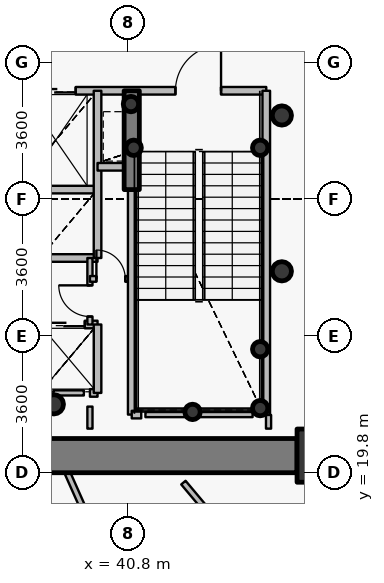
"""IFC4 building model, lengths in metres.
Left out: names, types, materials, properties, quantities, classifications, styles, units other than length and angle.
Written with IfcOpenShell. Run it as: python <this file> out.ifc"""

import sys

from ifc_helpers import new_model, si_unit, direction, frame, frame_2d, origin, origin_2d, place, context, subcontext, project, spatial, rectangle, hollow_circle, extrude, source, transform, mapped, element, fill, save


model = new_model("IFC4")
c1 = context("Model", 3, precision=1e-05, world=origin(), true_north=direction((0.0, 1.0)))
c2 = subcontext(c1, "Body", "Model", "MODEL_VIEW")
j1 = project(units=[si_unit("LENGTHUNIT", "METRE"), si_unit("PLANEANGLEUNIT", "RADIAN")], contexts=[c1])
p1 = place(None, origin())
s1 = spatial("IfcSite", under=j1, at=p1, CompositionType="ELEMENT")
p2 = place(p1, origin())
s2 = spatial("IfcBuilding", under=s1, at=p2, CompositionType="ELEMENT")
p3 = place(p2, frame((0.0, 0.0, 32.4)))
s3 = spatial("IfcBuildingStorey", under=s2, at=p3, CompositionType="ELEMENT", Elevation=32.4)
p4 = place(p3, frame((45.95, 20.25, 0.0), z_axis=(0.0, 0.0, 1.0), x_axis=(1.0, 0.0, 0.0)))
e1 = element("IfcColumn", 1, at=p4, inside=s3, PredefinedType="COLUMN", context=c2, shape_type="SweptSolid", body=[
    extrude(rectangle(XDim=1.4, YDim=1.4, at=origin_2d()), origin(), (0.0, 0.0, 1.0), 4.2),
])
p5 = place(p3, frame((38.85, 21.6, 0.0), z_axis=(0.0, 0.0, 1.0), x_axis=(1.0, 0.0, 0.0)))
e2 = element("IfcColumn", 2, at=p5, inside=s3, PredefinedType="COLUMN", context=c2, shape_type="SweptSolid", body=[
    extrude(hollow_circle(Radius=0.254, WallThickness=0.02, at=origin_2d()), origin(), (0.0, 0.0, 1.0), 4.2),
])
for number, where, z_axis, x_axis in (
    (3, (44.28, 21.5, 0.0), (0.0, 0.0, 1.0), (1.0, 0.0, 0.0)),
    (4, (44.28, 23.05, 0.0), (0.0, 0.0, 1.0), (1.0, 0.0, 0.0)),
    (5, (42.5, 21.4, 0.0), (0.0, 0.0, 1.0), (1.0, 0.0, 0.0)),
    (6, (40.95, 28.35, 0.0), (0.0, 0.0, 1.0), (1.0, 0.0, 0.0)),
    (7, (44.28, 28.35, 0.0), (0.0, 0.0, 1.0), (1.0, 0.0, 0.0)),
    (8, (40.88, 29.5, 0.0), (0.0, 0.0, 1.0), (1.0, 0.0, 0.0)),
):
    element("IfcColumn", number, at=place(p3, frame(where, z_axis=z_axis, x_axis=x_axis)), inside=s3, PredefinedType="COLUMN", context=c2, shape_type="SweptSolid", body=[
        extrude(hollow_circle(Radius=0.203, WallThickness=0.016, at=origin_2d()), origin(), (0.0, 0.0, 1.0), 4.2),
    ])
p6 = place(p3, frame((45.25, 20.25, 0.0), z_axis=(0.0, 0.0, 1.0), x_axis=(-1.0, 0.0, 0.0)))
e9 = element("IfcWall", 9, at=p6, inside=s3, PredefinedType="SHEAR", context=c2, shape_type="SweptSolid", body=[
    extrude(rectangle(XDim=18.5, YDim=0.9, at=frame_2d((9.25, 0.0))), origin(), (0.0, 0.0, 1.0), 3.4),
])
p7 = place(p6, frame((10.0, 0.0, 0.0)))
e10 = element("IfcOpeningElement", 10, at=p7, cuts=e9, PredefinedType="OPENING", context=c2, shape_type="SweptSolid", body=[
    extrude(rectangle(XDim=1.15, YDim=2.15, at=origin_2d()), frame((0.575, 0.46, 1.075), z_axis=(0.0, -1.0, 0.0), x_axis=(1.0, 0.0, 0.0)), (0.0, 0.0, 1.0), 0.92),
])
p8 = place(p3, frame((40.9, 27.25, 0.0), z_axis=(0.0, 0.0, 1.0), x_axis=(0.0, 1.0, 0.0)))
e11 = element("IfcWall", 11, at=p8, inside=s3, PredefinedType="SHEAR", context=c2, shape_type="SweptSolid", body=[
    extrude(rectangle(XDim=2.6, YDim=0.4, at=frame_2d((1.3, 0.0))), origin(), (0.0, 0.0, 1.0), 3.55),
])
for number, where, z_axis, x_axis in (
    (12, (44.85, 25.1, 0.0), (0.0, 0.0, 1.0), (1.0, 0.0, 0.0)),
    (13, (44.85, 29.2, 0.0), (0.0, 0.0, 1.0), (1.0, 0.0, 0.0)),
):
    element("IfcColumn", number, at=place(p3, frame(where, z_axis=z_axis, x_axis=x_axis)), inside=s3, PredefinedType="COLUMN", context=c2, shape_type="SweptSolid", body=[
        extrude(hollow_circle(Radius=0.254, WallThickness=0.02, at=origin_2d()), origin(), (0.0, 0.0, 1.0), 4.2),
    ])
p9 = place(p3, frame((35.05, 27.25, 0.0), z_axis=(0.0, 0.0, 1.0), x_axis=(1.0, 0.0, 0.0)))
e14 = element("IfcWall", 14, at=p9, inside=s3, PredefinedType="PARTITIONING", context=c2, shape_type="SweptSolid", body=[
    extrude(rectangle(XDim=4.95, YDim=0.2, at=frame_2d((2.475, 0.0))), origin(), (0.0, 0.0, 1.0), 3.535),
])
p10 = place(p3, frame((35.45, 23.7, 0.0), z_axis=(0.0, 0.0, 1.0), x_axis=(1.0, 0.0, 0.0)))
e15 = element("IfcWall", 15, at=p10, inside=s3, PredefinedType="PARTITIONING", context=c2, shape_type="SweptSolid", body=[
    extrude(rectangle(XDim=4.55, YDim=0.2, at=frame_2d((2.275, 0.0))), origin(), (0.0, 0.0, 1.0), 3.535),
])
p11 = place(p10, frame((0.25, 0.0, 0.0)))
e16 = element("IfcOpeningElement", 16, at=p11, cuts=e15, PredefinedType="OPENING", context=c2, shape_type="SweptSolid", body=[
    extrude(rectangle(XDim=1.05, YDim=2.15, at=origin_2d()), frame((0.525, 0.11, 1.075), z_axis=(0.0, -1.0, 0.0), x_axis=(1.0, 0.0, 0.0)), (0.0, 0.0, 1.0), 0.22),
])
p12 = place(p10, frame((1.745, 0.0, 0.0)))
e17 = element("IfcOpeningElement", 17, at=p12, cuts=e15, PredefinedType="OPENING", context=c2, shape_type="SweptSolid", body=[
    extrude(rectangle(XDim=1.05, YDim=2.15, at=origin_2d()), frame((0.525, 0.11, 1.075), z_axis=(0.0, -1.0, 0.0), x_axis=(1.0, 0.0, 0.0)), (0.0, 0.0, 1.0), 0.22),
])
p13 = place(p10, frame((3.165, 0.0, 0.0)))
e18 = element("IfcOpeningElement", 18, at=p13, cuts=e15, PredefinedType="OPENING", context=c2, shape_type="SweptSolid", body=[
    extrude(rectangle(XDim=1.05, YDim=2.15, at=origin_2d()), frame((0.525, 0.11, 1.075), z_axis=(0.0, -1.0, 0.0), x_axis=(1.0, 0.0, 0.0)), (0.0, 0.0, 1.0), 0.22),
])
p14 = place(p3, frame((35.45, 25.45, 0.0), z_axis=(0.0, 0.0, 1.0), x_axis=(1.0, 0.0, 0.0)))
e19 = element("IfcWall", 19, at=p14, inside=s3, PredefinedType="PARTITIONING", context=c2, shape_type="SweptSolid", body=[
    extrude(rectangle(XDim=4.55, YDim=0.2, at=frame_2d((2.275, 0.0))), origin(), (0.0, 0.0, 1.0), 3.535),
])
p15 = place(p3, frame((35.95, 29.85, 0.0), z_axis=(0.0, 0.0, 1.0), x_axis=(1.0, 0.0, 0.0)))
e20 = element("IfcWall", 20, at=p15, inside=s3, PredefinedType="PARTITIONING", context=c2, shape_type="SweptSolid", body=[
    extrude(rectangle(XDim=8.49, YDim=0.2, at=frame_2d((4.245, 0.0))), origin(), (0.0, 0.0, 1.0), 3.535),
])
p16 = place(p15, frame((6.1, 0.0, 0.0)))
e21 = element("IfcOpeningElement", 21, at=p16, cuts=e20, PredefinedType="OPENING", context=c2, shape_type="SweptSolid", body=[
    extrude(rectangle(XDim=1.2, YDim=2.15, at=origin_2d()), frame((0.6, 0.11, 1.075), z_axis=(0.0, -1.0, 0.0), x_axis=(1.0, 0.0, 0.0)), (0.0, 0.0, 1.0), 0.22),
])
p17 = place(p15, frame((0.37, 0.0, 0.0)))
e22 = element("IfcOpeningElement", 22, at=p17, cuts=e20, PredefinedType="OPENING", context=c2, shape_type="SweptSolid", body=[
    extrude(rectangle(XDim=1.15, YDim=2.15, at=origin_2d()), frame((0.575, 0.11, 1.075), z_axis=(0.0, -1.0, 0.0), x_axis=(1.0, 0.0, 0.0)), (0.0, 0.0, 1.0), 0.22),
])
p18 = place(p15, frame((2.425, 0.0, 0.0)))
e23 = element("IfcOpeningElement", 23, at=p18, cuts=e20, PredefinedType="OPENING", context=c2, shape_type="SweptSolid", body=[
    extrude(rectangle(XDim=1.05, YDim=2.15, at=origin_2d()), frame((0.525, 0.11, 1.075), z_axis=(0.0, -1.0, 0.0), x_axis=(1.0, 0.0, 0.0)), (0.0, 0.0, 1.0), 0.22),
])
p19 = place(p3, frame((39.206, 19.8, 0.0), z_axis=(0.0, 0.0, 1.0), x_axis=(0.406734516924, -0.913546404263, 0.0)))
e24 = element("IfcWall", 24, at=p19, inside=s3, PredefinedType="PARTITIONING", context=c2, shape_type="SweptSolid", body=[
    extrude(rectangle(XDim=17.213, YDim=0.15, at=frame_2d((8.606, 0.0))), origin(), (0.0, 0.0, 1.0), 3.285),
])
p20 = place(p19, frame((4.228, 0.0, 0.0)))
e25 = element("IfcOpeningElement", 25, at=p20, cuts=e24, PredefinedType="OPENING", context=c2, shape_type="SweptSolid", body=[
    extrude(rectangle(XDim=0.82, YDim=2.1, at=origin_2d()), frame((0.41, 0.085, 1.05), z_axis=(0.0, -1.0, 0.0), x_axis=(1.0, 0.0, 0.0)), (0.0, 0.0, 1.0), 0.17),
])
p21 = place(p19, frame((12.679, 0.0, 0.0)))
e26 = element("IfcOpeningElement", 26, at=p21, cuts=e24, PredefinedType="OPENING", context=c2, shape_type="SweptSolid", body=[
    extrude(rectangle(XDim=1.05, YDim=2.15, at=origin_2d()), frame((0.525, 0.085, 1.075), z_axis=(0.0, -1.0, 0.0), x_axis=(1.0, 0.0, 0.0)), (0.0, 0.0, 1.0), 0.17),
])
p22 = place(p3, frame((39.8, 21.9, 0.0), z_axis=(0.0, 0.0, 1.0), x_axis=(1.0, 0.0, 0.0)))
e27 = element("IfcWall", 27, at=p22, inside=s3, PredefinedType="PARTITIONING", context=c2, shape_type="SweptSolid", body=[
    extrude(rectangle(XDim=0.2, YDim=0.2, at=frame_2d((0.1, 0.0))), origin(), (0.0, 0.0, 1.0), 3.95),
])
p23 = place(p3, frame((39.8, 23.7, 0.0), z_axis=(0.0, 0.0, 1.0), x_axis=(0.0, 1.0, 0.0)))
e28 = element("IfcWall", 28, at=p23, inside=s3, PredefinedType="PARTITIONING", context=c2, shape_type="SweptSolid", body=[
    extrude(rectangle(XDim=1.75, YDim=0.135, at=frame_2d((0.875, 0.0))), origin(), (0.0, 0.0, 1.0), 3.95),
])
p24 = place(p23, frame((0.21, 0.0, 0.0)))
e29 = element("IfcOpeningElement", 29, at=p24, cuts=e28, PredefinedType="OPENING", context=c2, shape_type="SweptSolid", body=[
    extrude(rectangle(XDim=0.82, YDim=2.1, at=origin_2d()), frame((0.41, 0.078, 1.05), z_axis=(0.0, -1.0, 0.0), x_axis=(1.0, 0.0, 0.0)), (0.0, 0.0, 1.0), 0.155),
])
p25 = place(p3, frame((39.8, 24.9, 0.0), z_axis=(0.0, 0.0, 1.0), x_axis=(1.0, 0.0, 0.0)))
e30 = element("IfcWall", 30, at=p25, inside=s3, PredefinedType="PARTITIONING", context=c2, shape_type="SweptSolid", body=[
    extrude(rectangle(XDim=1.1, YDim=0.15, at=frame_2d((0.55, 0.0))), origin(), (0.0, 0.0, 1.0), 3.95),
])
p26 = place(p25, frame((0.17, 0.0, 0.0)))
e31 = element("IfcOpeningElement", 31, at=p26, cuts=e30, PredefinedType="OPENING", context=c2, shape_type="SweptSolid", body=[
    extrude(rectangle(XDim=0.76, YDim=2.1, at=origin_2d()), frame((0.38, 0.085, 1.05), z_axis=(0.0, -1.0, 0.0), x_axis=(1.0, 0.0, 0.0)), (0.0, 0.0, 1.0), 0.17),
])
p27 = place(p3, frame((40.0, 21.9, 0.0), z_axis=(0.0, 0.0, 1.0), x_axis=(0.0, 1.0, 0.0)))
e32 = element("IfcWall", 32, at=p27, inside=s3, PredefinedType="PARTITIONING", context=c2, shape_type="SweptSolid", body=[
    extrude(rectangle(XDim=1.8, YDim=0.2, at=frame_2d((0.9, 0.0))), origin(), (0.0, 0.0, 1.0), 3.95),
])
p28 = place(p3, frame((40.0, 25.45, 0.0), z_axis=(0.0, 0.0, 1.0), x_axis=(0.0, 1.0, 0.0)))
e33 = element("IfcWall", 33, at=p28, inside=s3, PredefinedType="PARTITIONING", context=c2, shape_type="SweptSolid", body=[
    extrude(rectangle(XDim=4.4, YDim=0.2, at=frame_2d((2.2, 0.0))), origin(), (0.0, 0.0, 1.0), 3.95),
])
p29 = place(p3, frame((40.0, 27.85, 0.0), z_axis=(0.0, 0.0, 1.0), x_axis=(1.0, 0.0, 0.0)))
e34 = element("IfcWall", 34, at=p29, inside=s3, PredefinedType="PARTITIONING", context=c2, shape_type="SweptSolid", body=[
    extrude(rectangle(XDim=0.9, YDim=0.2, at=frame_2d((0.45, 0.0))), origin(), (0.0, 0.0, 1.0), 3.95),
])
p30 = place(p3, frame((40.9, 21.33, 0.0), z_axis=(0.0, 0.0, 1.0), x_axis=(0.0, 1.0, 0.0)))
e35 = element("IfcWall", 35, at=p30, inside=s3, PredefinedType="PARTITIONING", context=c2, shape_type="SweptSolid", body=[
    extrude(rectangle(XDim=5.91, YDim=0.2, at=frame_2d((2.955, 0.0))), origin(), (0.0, 0.0, 1.0), 3.485),
])
p31 = place(p3, frame((40.9, 21.33, 0.0), z_axis=(0.0, 0.0, 1.0), x_axis=(1.0, 0.0, 0.0)))
e36 = element("IfcWall", 36, at=p31, inside=s3, PredefinedType="PARTITIONING", context=c2, shape_type="SweptSolid", body=[
    extrude(rectangle(XDim=0.25, YDim=0.2, at=frame_2d((0.125, 0.0))), origin(), (0.0, 0.0, 1.0), 3.485),
])
p32 = place(p3, frame((44.44, 21.33, 0.0), z_axis=(0.0, 0.0, 1.0), x_axis=(0.0, 1.0, 0.0)))
e37 = element("IfcWall", 37, at=p32, inside=s3, PredefinedType="PARTITIONING", context=c2, shape_type="SweptSolid", body=[
    extrude(rectangle(XDim=8.52, YDim=0.2, at=frame_2d((4.26, 0.0))), origin(), (0.0, 0.0, 1.0), 3.95),
])
p33 = place(p3, frame((44.08, 21.33, 0.0), z_axis=(0.0, 0.0, 1.0), x_axis=(-1.0, 0.0, 0.0)))
e38 = element("IfcWall", 38, at=p33, inside=s3, PredefinedType="PARTITIONING", context=c2, shape_type="SweptSolid", body=[
    extrude(rectangle(XDim=2.82, YDim=0.135, at=frame_2d((1.41, 0.0))), origin(), (0.0, 0.0, 1.0), 3.485),
])
p34 = place(p3, frame((39.64, 21.9, 0.0), z_axis=(0.0, 0.0, 1.0), x_axis=(-1.0, 0.0, 0.0)))
e39 = element("IfcWall", 39, at=p34, inside=s3, PredefinedType="PARTITIONING", context=c2, shape_type="SweptSolid", body=[
    extrude(rectangle(XDim=0.8, YDim=0.135, at=frame_2d((0.4, 0.0))), origin(), (0.0, 0.0, 1.0), 3.535),
])
p35 = place(p3, frame((39.8, 20.96, 0.0), z_axis=(0.0, 0.0, 1.0), x_axis=(0.0, 1.0, 0.0)))
e40 = element("IfcWall", 40, at=p35, inside=s3, PredefinedType="PARTITIONING", context=c2, shape_type="SweptSolid", body=[
    extrude(rectangle(XDim=0.58, YDim=0.135, at=frame_2d((0.29, 0.0))), origin(), (0.0, 0.0, 1.0), 3.485),
])
p36 = place(p3, frame((44.5, 20.96, 0.0), z_axis=(0.0, 0.0, 1.0), x_axis=(0.0, 1.0, 0.0)))
e41 = element("IfcWall", 41, at=p36, inside=s3, PredefinedType="PARTITIONING", context=c2, shape_type="SweptSolid", body=[
    extrude(rectangle(XDim=0.36, YDim=0.135, at=frame_2d((0.18, 0.0))), origin(), (0.0, 0.0, 1.0), 3.95),
])
p37 = place(p3, frame((42.26, 19.54, 0.0), z_axis=(0.0, 0.0, 1.0), x_axis=(0.642773520502, -0.766056265128, 0.0)))
e42 = element("IfcWall", 42, at=p37, inside=s3, PredefinedType="PARTITIONING", context=c2, shape_type="SweptSolid", body=[
    extrude(rectangle(XDim=5.418, YDim=0.15, at=frame_2d((2.709, 0.0))), origin(), (0.0, 0.0, 1.0), 3.95),
])
m1 = source(origin(), c2, "Body", "SweptSolid", [
    extrude(rectangle(XDim=1.2, YDim=2.15, at=origin_2d()), frame((0.6, 0.025, 1.075), z_axis=(0.0, -1.0, 0.0), x_axis=(1.0, 0.0, 0.0)), (0.0, 0.0, 1.0), 0.05),
])
p38 = place(p16, origin())
e43 = element("IfcDoor", 43, at=p38, inside=s3, OperationType="SINGLE_SWING_RIGHT", PredefinedType="DOOR", context=c2, shape_type="MappedRepresentation", body=[
    mapped(m1, transform((0.0, 0.0, 0.0), x_axis=(1.0, 0.0, 0.0), y_axis=(0.0, 1.0, 0.0), z_axis=(0.0, 0.0, 1.0), scale=1.0)),
])
fill(e21, e43)
m2 = source(origin(), c2, "Body", "SweptSolid", [
    extrude(rectangle(XDim=1.05, YDim=2.15, at=origin_2d()), frame((0.525, 0.025, 1.075), z_axis=(0.0, -1.0, 0.0), x_axis=(1.0, 0.0, 0.0)), (0.0, 0.0, 1.0), 0.05),
])
p39 = place(p18, origin())
e44 = element("IfcDoor", 44, at=p39, inside=s3, OperationType="DOUBLE_DOOR_SLIDING", PredefinedType="USERDEFINED", context=c2, shape_type="MappedRepresentation", body=[
    mapped(m2, transform((0.0, 0.0, 0.0), x_axis=(1.0, 0.0, 0.0), y_axis=(0.0, 1.0, 0.0), z_axis=(0.0, 0.0, 1.0), scale=1.0)),
])
fill(e23, e44)
p40 = place(p13, origin())
e45 = element("IfcDoor", 45, at=p40, inside=s3, OperationType="DOUBLE_DOOR_SLIDING", PredefinedType="USERDEFINED", context=c2, shape_type="MappedRepresentation", body=[
    mapped(m2, transform((0.0, 0.0, 0.0), x_axis=(1.0, 0.0, 0.0), y_axis=(0.0, 1.0, 0.0), z_axis=(0.0, 0.0, 1.0), scale=1.0)),
])
fill(e18, e45)
m3 = source(origin(), c2, "Body", "SweptSolid", [
    extrude(rectangle(XDim=0.82, YDim=2.1, at=origin_2d()), frame((0.41, 0.025, 1.05), z_axis=(0.0, -1.0, 0.0), x_axis=(1.0, 0.0, 0.0)), (0.0, 0.0, 1.0), 0.05),
])
p41 = place(p24, origin())
e46 = element("IfcDoor", 46, at=p41, inside=s3, OperationType="SINGLE_SWING_RIGHT", PredefinedType="DOOR", context=c2, shape_type="MappedRepresentation", body=[
    mapped(m3, transform((0.0, 0.0, 0.0), x_axis=(1.0, 0.0, 0.0), y_axis=(0.0, 1.0, 0.0), z_axis=(0.0, 0.0, 1.0), scale=1.0)),
])
fill(e29, e46)
m4 = source(origin(), c2, "Body", "SweptSolid", [
    extrude(rectangle(XDim=0.76, YDim=2.1, at=origin_2d()), frame((0.38, 0.025, 1.05), z_axis=(0.0, -1.0, 0.0), x_axis=(1.0, 0.0, 0.0)), (0.0, 0.0, 1.0), 0.05),
])
p42 = place(p26, origin())
e47 = element("IfcDoor", 47, at=p42, inside=s3, OperationType="SINGLE_SWING_LEFT", PredefinedType="DOOR", context=c2, shape_type="MappedRepresentation", body=[
    mapped(m4, transform((0.0, 0.0, 0.0), x_axis=(1.0, 0.0, 0.0), y_axis=(0.0, 1.0, 0.0), z_axis=(0.0, 0.0, 1.0), scale=1.0)),
])
fill(e31, e47)
save(model, sys.argv[1])
